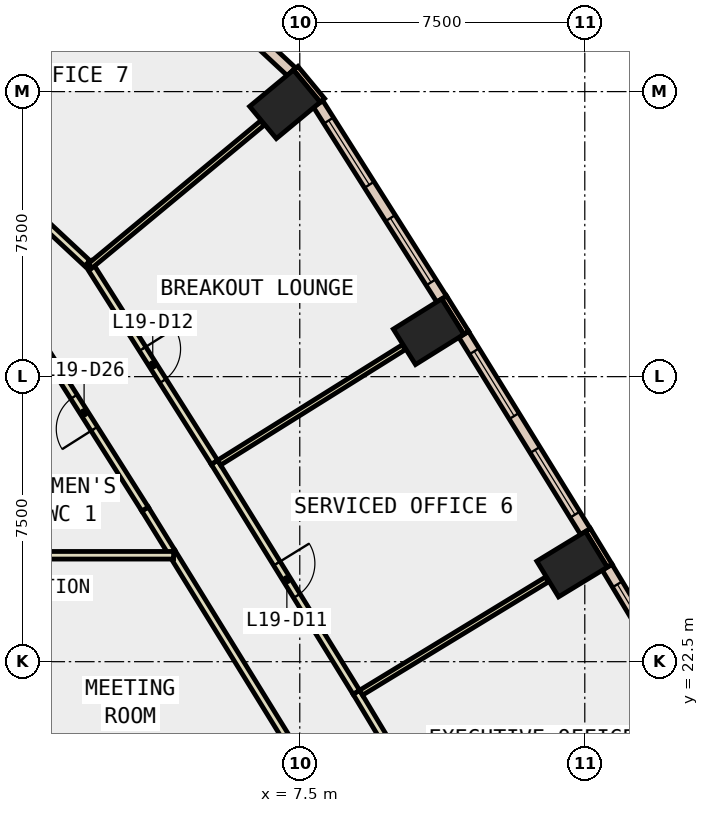
"""IFC4 building model, lengths in metres.
Left out: names, types, materials, properties, quantities, classifications, styles, units other than length and angle.
Written with IfcOpenShell. Run it as: python <this file> out.ifc"""

import sys

from ifc_helpers import new_model, si_unit, direction, frame, frame_2d, origin, origin_2d, place, context, subcontext, project, spatial, rectangle, extrude, element, fill, save


model = new_model("IFC4")
c1 = context("Model", 3, precision=1e-05, world=origin(), true_north=direction((0.0, 1.0)))
c2 = subcontext(c1, "Body", "Model", "MODEL_VIEW")
j1 = project(units=[si_unit("LENGTHUNIT", "METRE"), si_unit("PLANEANGLEUNIT", "RADIAN")], contexts=[c1])
p1 = place(None, origin())
s1 = spatial("IfcSite", under=j1, at=p1, CompositionType="ELEMENT")
p2 = place(p1, origin())
s2 = spatial("IfcBuilding", under=s1, at=p2, CompositionType="ELEMENT")
p3 = place(p2, frame((0.0, 0.0, 90.8)))
s3 = spatial("IfcBuildingStorey", under=s2, at=p3, CompositionType="ELEMENT", Elevation=90.8)
for number, where, z_axis, x_axis in (
    (1, (14.664, 25.065, -0.4), (0.0, 0.0, 1.0), (-0.52, 0.854, 0.0)),
    (2, (10.89, 31.182, -0.4), (0.0, 0.0, 1.0), (-0.53, 0.848, 0.0)),
    (3, (7.109, 37.166, -0.4), (0.0, 0.0, 1.0), (-0.638, 0.77, 0.0)),
):
    element("IfcColumn", number, at=place(p3, frame(where, z_axis=z_axis, x_axis=x_axis)), inside=s3, PredefinedType="COLUMN", context=c2, shape_type="SweptSolid", body=[
        extrude(rectangle(XDim=1.1, YDim=1.5, at=origin_2d()), origin(), (0.0, 0.0, 1.0), 4.2),
    ])
p4 = place(p3, frame((15.655, 25.024, 0.0), z_axis=(0.0, 0.0, 1.0), x_axis=(-0.51977099384, 0.854305632641, 0.0)))
e4 = element("IfcWall", 4, at=p4, inside=s3, PredefinedType="STANDARD", context=c2, shape_type="SweptSolid", body=[
    extrude(rectangle(XDim=1.101, YDim=0.15, at=frame_2d((0.55, 0.0))), origin(), (0.0, 0.0, 1.0), 3.8),
])
p5 = place(p3, frame((11.881, 31.153, 0.0), z_axis=(0.0, 0.0, 1.0), x_axis=(-0.52997899071, 0.848010771987, 0.0)))
e5 = element("IfcWall", 5, at=p5, inside=s3, PredefinedType="STANDARD", context=c2, shape_type="SweptSolid", body=[
    extrude(rectangle(XDim=1.1, YDim=0.15, at=frame_2d((0.55, 0.0))), origin(), (0.0, 0.0, 1.0), 3.8),
])
p6 = place(p3, frame((8.095, 37.27, 0.0), z_axis=(0.0, 0.0, 1.0), x_axis=(-0.638544483078, 0.769584916127, 0.0)))
e6 = element("IfcWall", 6, at=p6, inside=s3, PredefinedType="STANDARD", context=c2, shape_type="SweptSolid", body=[
    extrude(rectangle(XDim=1.099, YDim=0.15, at=frame_2d((0.55, 0.0))), origin(), (0.0, 0.0, 1.0), 3.8),
])
p7 = place(p3, frame((18.729, 19.757, 0.0), z_axis=(0.0, 0.0, 1.0), x_axis=(-0.515102053092, 0.857128855483, 0.0)))
e7 = element("IfcWall", 7, at=p7, inside=s3, PredefinedType="STANDARD", context=c2, shape_type="SweptSolid", body=[
    extrude(rectangle(XDim=6.098, YDim=0.3, at=frame_2d((3.049, 0.0))), origin(), (0.0, 0.0, 1.0), 3.8),
])
p8 = place(p7, frame((0.525, 0.0, 0.9)))
e8 = element("IfcOpeningElement", 8, at=p8, cuts=e7, PredefinedType="OPENING", context=c2, shape_type="SweptSolid", body=[
    extrude(rectangle(XDim=2.0, YDim=2.6, at=frame_2d((1.0, 1.3))), frame((0.0, 0.16, 0.0), z_axis=(0.0, -1.0, 0.0), x_axis=(1.0, 0.0, 0.0)), (0.0, 0.0, 1.0), 0.32),
])
p9 = place(p7, frame((3.574, 0.0, 0.9)))
e9 = element("IfcOpeningElement", 9, at=p9, cuts=e7, PredefinedType="OPENING", context=c2, shape_type="SweptSolid", body=[
    extrude(rectangle(XDim=2.0, YDim=2.6, at=frame_2d((1.0, 1.3))), frame((0.0, 0.16, 0.0), z_axis=(0.0, -1.0, 0.0), x_axis=(1.0, 0.0, 0.0)), (0.0, 0.0, 1.0), 0.32),
])
p10 = place(p3, frame((15.017, 25.922, 0.0), z_axis=(0.0, 0.0, 1.0), x_axis=(-0.525204788886, 0.850975869065, 0.0)))
e10 = element("IfcWall", 10, at=p10, inside=s3, PredefinedType="STANDARD", context=c2, shape_type="SweptSolid", body=[
    extrude(rectangle(XDim=6.099, YDim=0.3, at=frame_2d((3.049, 0.0))), origin(), (0.0, 0.0, 1.0), 3.8),
])
p11 = place(p10, frame((0.525, 0.0, 0.9)))
e11 = element("IfcOpeningElement", 11, at=p11, cuts=e10, PredefinedType="OPENING", context=c2, shape_type="SweptSolid", body=[
    extrude(rectangle(XDim=2.0, YDim=2.6, at=frame_2d((1.0, 1.3))), frame((0.0, 0.16, 0.0), z_axis=(0.0, -1.0, 0.0), x_axis=(1.0, 0.0, 0.0)), (0.0, 0.0, 1.0), 0.32),
])
p12 = place(p10, frame((3.574, 0.0, 0.9)))
e12 = element("IfcOpeningElement", 12, at=p12, cuts=e10, PredefinedType="OPENING", context=c2, shape_type="SweptSolid", body=[
    extrude(rectangle(XDim=2.0, YDim=2.6, at=frame_2d((1.0, 1.3))), frame((0.0, 0.16, 0.0), z_axis=(0.0, -1.0, 0.0), x_axis=(1.0, 0.0, 0.0)), (0.0, 0.0, 1.0), 0.32),
])
p13 = place(p3, frame((11.232, 32.043, 0.0), z_axis=(0.0, 0.0, 1.0), x_axis=(-0.534869492536, 0.84493468739, 0.0)))
e13 = element("IfcWall", 13, at=p13, inside=s3, PredefinedType="STANDARD", context=c2, shape_type="SweptSolid", body=[
    extrude(rectangle(XDim=6.076, YDim=0.3, at=frame_2d((3.038, 0.0))), origin(), (0.0, 0.0, 1.0), 3.8),
])
p14 = place(p13, frame((0.519, 0.0, 0.9)))
e14 = element("IfcOpeningElement", 14, at=p14, cuts=e13, PredefinedType="OPENING", context=c2, shape_type="SweptSolid", body=[
    extrude(rectangle(XDim=2.0, YDim=2.6, at=frame_2d((1.0, 1.3))), frame((0.0, 0.16, 0.0), z_axis=(0.0, -1.0, 0.0), x_axis=(1.0, 0.0, 0.0)), (0.0, 0.0, 1.0), 0.32),
])
p15 = place(p13, frame((3.557, 0.0, 0.9)))
e15 = element("IfcOpeningElement", 15, at=p15, cuts=e13, PredefinedType="OPENING", context=c2, shape_type="SweptSolid", body=[
    extrude(rectangle(XDim=2.0, YDim=2.6, at=frame_2d((1.0, 1.3))), frame((0.0, 0.16, 0.0), z_axis=(0.0, -1.0, 0.0), x_axis=(1.0, 0.0, 0.0)), (0.0, 0.0, 1.0), 0.32),
])
p16 = place(p3, frame((7.281, 38.022, 0.0), z_axis=(0.0, 0.0, 1.0), x_axis=(-0.731614451791, 0.681718632525, 0.0)))
e16 = element("IfcWall", 16, at=p16, inside=s3, PredefinedType="STANDARD", context=c2, shape_type="SweptSolid", body=[
    extrude(rectangle(XDim=3.41, YDim=0.3, at=frame_2d((1.705, 0.0))), origin(), (0.0, 0.0, 1.0), 3.8),
])
p17 = place(p16, frame((1.005, 0.0, 0.9)))
e17 = element("IfcOpeningElement", 17, at=p17, cuts=e16, PredefinedType="OPENING", context=c2, shape_type="SweptSolid", body=[
    extrude(rectangle(XDim=1.4, YDim=2.6, at=frame_2d((0.7, 1.3))), frame((0.0, 0.16, 0.0), z_axis=(0.0, -1.0, 0.0), x_axis=(1.0, 0.0, 0.0)), (0.0, 0.0, 1.0), 0.32),
])
p18 = place(p3, frame((7.148, 20.488, 0.0), z_axis=(0.0, 0.0, 1.0), x_axis=(-0.525162244663, 0.851002125016, 0.0)))
e18 = element("IfcWall", 18, at=p18, inside=s3, PredefinedType="PARTITIONING", context=c2, shape_type="SweptSolid", body=[
    extrude(rectangle(XDim=5.754, YDim=0.2, at=frame_2d((2.877, 0.0))), origin(), (0.0, 0.0, 1.0), 3.8),
])
p19 = place(p3, frame((4.126, 25.385, 0.0), z_axis=(0.0, 0.0, 1.0), x_axis=(-0.524824420869, 0.851210507019, 0.0)))
e19 = element("IfcWall", 19, at=p19, inside=s3, PredefinedType="PARTITIONING", context=c2, shape_type="SweptSolid", body=[
    extrude(rectangle(XDim=1.33, YDim=0.2, at=frame_2d((0.665, 0.0))), origin(), (0.0, 0.0, 1.0), 3.8),
])
p20 = place(p3, frame((3.428, 26.517, 0.0), z_axis=(0.0, 0.0, 1.0), x_axis=(-0.535034639024, 0.844830122003, 0.0)))
e20 = element("IfcWall", 20, at=p20, inside=s3, PredefinedType="PARTITIONING", context=c2, shape_type="SweptSolid", body=[
    extrude(rectangle(XDim=5.994, YDim=0.2, at=frame_2d((2.997, 0.0))), origin(), (0.0, 0.0, 1.0), 3.8),
])
p21 = place(p20, frame((2.497, 0.0, 0.0)))
e21 = element("IfcOpeningElement", 21, at=p21, cuts=e20, PredefinedType="OPENING", context=c2, shape_type="SweptSolid", body=[
    extrude(rectangle(XDim=1.0, YDim=2.1, at=frame_2d((0.5, 1.05))), frame((0.0, 0.11, 0.0), z_axis=(0.0, -1.0, 0.0), x_axis=(1.0, 0.0, 0.0)), (0.0, 0.0, 1.0), 0.22),
])
p22 = place(p3, frame((8.989, 21.696, 0.0), z_axis=(0.0, 0.0, 1.0), x_axis=(0.515000602442, -0.857189815318, 0.0)))
e22 = element("IfcWall", 22, at=p22, inside=s3, PredefinedType="PARTITIONING", context=c2, shape_type="SweptSolid", body=[
    extrude(rectangle(XDim=7.11, YDim=0.2, at=frame_2d((3.555, 0.0))), origin(), (0.0, 0.0, 1.0), 3.8),
])
p23 = place(p22, frame((3.13, 0.0, 0.0)))
e23 = element("IfcOpeningElement", 23, at=p23, cuts=e22, PredefinedType="OPENING", context=c2, shape_type="SweptSolid", body=[
    extrude(rectangle(XDim=1.0, YDim=2.1, at=frame_2d((0.5, 1.05))), frame((0.0, 0.11, 0.0), z_axis=(0.0, -1.0, 0.0), x_axis=(1.0, 0.0, 0.0)), (0.0, 0.0, 1.0), 0.22),
])
p24 = place(p3, frame((5.254, 27.747, 0.0), z_axis=(0.0, 0.0, 1.0), x_axis=(0.52516023635, -0.851003364363, 0.0)))
e24 = element("IfcWall", 24, at=p24, inside=s3, PredefinedType="PARTITIONING", context=c2, shape_type="SweptSolid", body=[
    extrude(rectangle(XDim=7.11, YDim=0.2, at=frame_2d((3.555, 0.0))), origin(), (0.0, 0.0, 1.0), 3.8),
])
p25 = place(p24, frame((3.13, 0.0, 0.0)))
e25 = element("IfcOpeningElement", 25, at=p25, cuts=e24, PredefinedType="OPENING", context=c2, shape_type="SweptSolid", body=[
    extrude(rectangle(XDim=1.0, YDim=2.1, at=frame_2d((0.5, 1.05))), frame((0.0, 0.11, 0.0), z_axis=(0.0, -1.0, 0.0), x_axis=(1.0, 0.0, 0.0)), (0.0, 0.0, 1.0), 0.22),
])
p26 = place(p3, frame((1.929, 32.997, 0.0), z_axis=(0.0, 0.0, 1.0), x_axis=(0.534863276222, -0.844938622474, 0.0)))
e26 = element("IfcWall", 26, at=p26, inside=s3, PredefinedType="PARTITIONING", context=c2, shape_type="SweptSolid", body=[
    extrude(rectangle(XDim=6.215, YDim=0.2, at=frame_2d((3.107, 0.0))), origin(), (0.0, 0.0, 1.0), 3.8),
])
p27 = place(p26, frame((2.682, 0.0, 0.0)))
e27 = element("IfcOpeningElement", 27, at=p27, cuts=e26, PredefinedType="OPENING", context=c2, shape_type="SweptSolid", body=[
    extrude(rectangle(XDim=1.0, YDim=2.1, at=frame_2d((0.5, 1.05))), frame((0.0, 0.11, 0.0), z_axis=(0.0, -1.0, 0.0), x_axis=(1.0, 0.0, 0.0)), (0.0, 0.0, 1.0), 0.22),
])
p28 = place(p3, frame((0.66, 34.145, 0.0), z_axis=(0.0, 0.0, 1.0), x_axis=(0.731549606095, -0.681788217721, 0.0)))
e28 = element("IfcWall", 28, at=p28, inside=s3, PredefinedType="PARTITIONING", context=c2, shape_type="SweptSolid", body=[
    extrude(rectangle(XDim=1.707, YDim=0.2, at=frame_2d((0.854, 0.0))), origin(), (0.0, 0.0, 1.0), 3.8),
])
p29 = place(p3, frame((0.1, 25.3, 0.0), z_axis=(0.0, 0.0, 1.0), x_axis=(1.0, 0.0, 0.0)))
e29 = element("IfcWall", 29, at=p29, inside=s3, PredefinedType="PARTITIONING", context=c2, shape_type="SweptSolid", body=[
    extrude(rectangle(XDim=4.079, YDim=0.2, at=frame_2d((2.04, 0.0))), origin(), (0.0, 0.0, 1.0), 3.8),
])
p30 = place(p3, frame((9.113, 21.684, 0.0), z_axis=(0.0, 0.0, 1.0), x_axis=(0.854075097122, 0.520149717367, 0.0)))
e30 = element("IfcWall", 30, at=p30, inside=s3, PredefinedType="PARTITIONING", context=c2, shape_type="SweptSolid", body=[
    extrude(rectangle(XDim=5.729, YDim=0.15, at=frame_2d((2.865, 0.0))), origin(), (0.0, 0.0, 1.0), 3.8),
])
p31 = place(p3, frame((5.378, 27.737, 0.0), z_axis=(0.0, 0.0, 1.0), x_axis=(0.848005484868, 0.529987450449, 0.0)))
e31 = element("IfcWall", 31, at=p31, inside=s3, PredefinedType="PARTITIONING", context=c2, shape_type="SweptSolid", body=[
    extrude(rectangle(XDim=5.73, YDim=0.15, at=frame_2d((2.865, 0.0))), origin(), (0.0, 0.0, 1.0), 3.8),
])
p32 = place(p3, frame((1.982, 32.913, 0.0), z_axis=(0.0, 0.0, 1.0), x_axis=(0.769679976891, 0.638429896835, 0.0)))
e32 = element("IfcWall", 32, at=p32, inside=s3, PredefinedType="PARTITIONING", context=c2, shape_type="SweptSolid", body=[
    extrude(rectangle(XDim=5.891, YDim=0.15, at=frame_2d((2.946, 0.0))), origin(), (0.0, 0.0, 1.0), 3.8),
])
p33 = place(p9, origin())
e33 = element("IfcWindow", 33, at=p33, inside=s3, PartitioningType="SINGLE_PANEL", PredefinedType="WINDOW", context=c2, shape_type="SweptSolid", body=[
    extrude(rectangle(XDim=2.0, YDim=2.6, at=frame_2d((1.0, 1.3))), frame((0.0, 0.03, 0.0), z_axis=(0.0, -1.0, 0.0), x_axis=(1.0, 0.0, 0.0)), (0.0, 0.0, 1.0), 0.06),
])
fill(e9, e33)
p34 = place(p11, origin())
e34 = element("IfcWindow", 34, at=p34, inside=s3, PartitioningType="SINGLE_PANEL", PredefinedType="WINDOW", context=c2, shape_type="SweptSolid", body=[
    extrude(rectangle(XDim=2.0, YDim=2.6, at=frame_2d((1.0, 1.3))), frame((0.0, 0.03, 0.0), z_axis=(0.0, -1.0, 0.0), x_axis=(1.0, 0.0, 0.0)), (0.0, 0.0, 1.0), 0.06),
])
fill(e11, e34)
p35 = place(p12, origin())
e35 = element("IfcWindow", 35, at=p35, inside=s3, PartitioningType="SINGLE_PANEL", PredefinedType="WINDOW", context=c2, shape_type="SweptSolid", body=[
    extrude(rectangle(XDim=2.0, YDim=2.6, at=frame_2d((1.0, 1.3))), frame((0.0, 0.03, 0.0), z_axis=(0.0, -1.0, 0.0), x_axis=(1.0, 0.0, 0.0)), (0.0, 0.0, 1.0), 0.06),
])
fill(e12, e35)
p36 = place(p14, origin())
e36 = element("IfcWindow", 36, at=p36, inside=s3, PartitioningType="SINGLE_PANEL", PredefinedType="WINDOW", context=c2, shape_type="SweptSolid", body=[
    extrude(rectangle(XDim=2.0, YDim=2.6, at=frame_2d((1.0, 1.3))), frame((0.0, 0.03, 0.0), z_axis=(0.0, -1.0, 0.0), x_axis=(1.0, 0.0, 0.0)), (0.0, 0.0, 1.0), 0.06),
])
fill(e14, e36)
p37 = place(p15, origin())
e37 = element("IfcWindow", 37, at=p37, inside=s3, PartitioningType="SINGLE_PANEL", PredefinedType="WINDOW", context=c2, shape_type="SweptSolid", body=[
    extrude(rectangle(XDim=2.0, YDim=2.6, at=frame_2d((1.0, 1.3))), frame((0.0, 0.03, 0.0), z_axis=(0.0, -1.0, 0.0), x_axis=(1.0, 0.0, 0.0)), (0.0, 0.0, 1.0), 0.06),
])
fill(e15, e37)
p38 = place(p25, origin())
e38 = element("IfcDoor", 38, at=p38, inside=s3, OperationType="SINGLE_SWING_LEFT", PredefinedType="DOOR", context=c2, shape_type="SweptSolid", body=[
    extrude(rectangle(XDim=1.0, YDim=2.1, at=frame_2d((0.5, 1.05))), frame((0.0, 0.025, 0.0), z_axis=(0.0, -1.0, 0.0), x_axis=(1.0, 0.0, 0.0)), (0.0, 0.0, 1.0), 0.05),
])
fill(e25, e38)
p39 = place(p27, origin())
e39 = element("IfcDoor", 39, at=p39, inside=s3, OperationType="SINGLE_SWING_LEFT", PredefinedType="DOOR", context=c2, shape_type="SweptSolid", body=[
    extrude(rectangle(XDim=1.0, YDim=2.1, at=frame_2d((0.5, 1.05))), frame((0.0, 0.025, 0.0), z_axis=(0.0, -1.0, 0.0), x_axis=(1.0, 0.0, 0.0)), (0.0, 0.0, 1.0), 0.05),
])
fill(e27, e39)
p40 = place(p21, origin())
e40 = element("IfcDoor", 40, at=p40, inside=s3, OperationType="SINGLE_SWING_LEFT", PredefinedType="DOOR", context=c2, shape_type="SweptSolid", body=[
    extrude(rectangle(XDim=1.0, YDim=2.1, at=frame_2d((0.5, 1.05))), frame((0.0, 0.025, 0.0), z_axis=(0.0, -1.0, 0.0), x_axis=(1.0, 0.0, 0.0)), (0.0, 0.0, 1.0), 0.05),
])
fill(e21, e40)
save(model, sys.argv[1])
